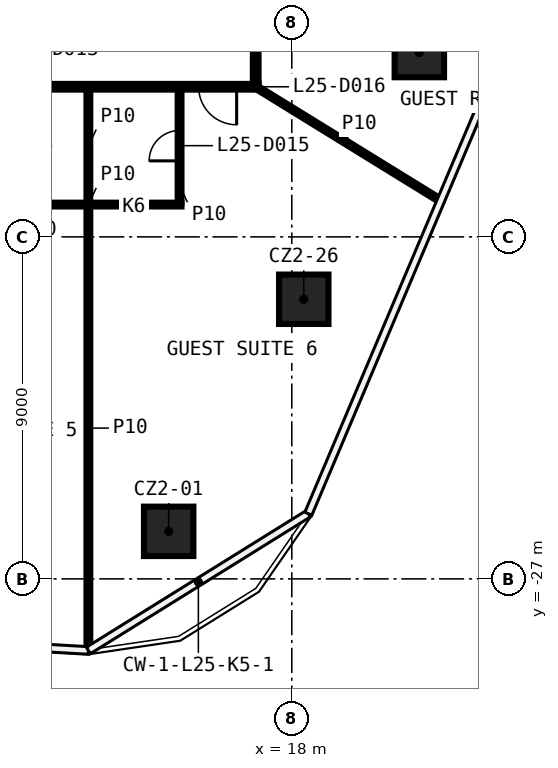
"""IFC4 building model, lengths in metres.
Left out: names, types, materials, properties, quantities, classifications, styles, units other than length and angle.
Written with IfcOpenShell. Run it as: python <this file> out.ifc"""

import sys

from ifc_helpers import new_model, si_unit, direction, frame, frame_2d, origin, origin_2d, place, context, subcontext, project, spatial, rectangle, extrude, element, fill, save


model = new_model("IFC4")
c1 = context("Model", 3, precision=1e-05, world=origin(), true_north=direction((0.0, 1.0)))
c2 = subcontext(c1, "Body", "Model", "MODEL_VIEW")
j1 = project(units=[si_unit("LENGTHUNIT", "METRE"), si_unit("PLANEANGLEUNIT", "RADIAN")], contexts=[c1])
p1 = place(None, origin())
s1 = spatial("IfcSite", under=j1, at=p1, CompositionType="ELEMENT")
p2 = place(p1, origin())
s2 = spatial("IfcBuilding", under=s1, at=p2, CompositionType="ELEMENT")
p3 = place(p2, frame((0.0, 0.0, 117.4)))
s3 = spatial("IfcBuildingStorey", under=s2, at=p3, CompositionType="ELEMENT", Elevation=117.4)
for number, where, z_axis, x_axis in (
    (1, (14.76, -25.749, 0.0), (0.0, 0.0, 1.0), (1.0, 0.0, 0.0)),
    (2, (21.356, -13.15, 0.0), (0.0, 0.0, 1.0), (1.0, 0.0, 0.0)),
    (3, (18.315, -19.642, 0.0), (0.0, 0.0, 1.0), (1.0, 0.0, 0.0)),
):
    element("IfcColumn", number, at=place(p3, frame(where, z_axis=z_axis, x_axis=x_axis)), inside=s3, PredefinedType="COLUMN", context=c2, shape_type="SweptSolid", body=[
        extrude(rectangle(XDim=1.3, YDim=1.3, at=origin_2d()), origin(), (0.0, 0.0, 1.0), 3.3),
    ])
p4 = place(p3, frame((10.197, -17.15, 0.0), z_axis=(0.0, 0.0, 1.0), x_axis=(1.0, 0.0, 0.0)))
e4 = element("IfcWall", 4, at=p4, inside=s3, PredefinedType="PARTITIONING", context=c2, shape_type="SweptSolid", body=[
    extrude(rectangle(XDim=4.9, YDim=0.1, at=frame_2d((2.45, 0.0))), origin(), (0.0, 0.0, 1.0), 3.3),
])
p5 = place(p3, frame((17.125, -14.05, 0.0), z_axis=(0.0, 0.0, 1.0), x_axis=(-1.0, 0.0, 0.0)))
e5 = element("IfcWall", 5, at=p5, inside=s3, PredefinedType="PARTITIONING", context=c2, shape_type="SweptSolid", body=[
    extrude(rectangle(XDim=34.25, YDim=0.15, at=frame_2d((17.125, 0.0))), origin(), (0.0, 0.0, 1.0), 3.3),
])
p6 = place(p5, frame((32.089, 0.0, 0.0)))
e6 = element("IfcOpeningElement", 6, at=p6, cuts=e5, PredefinedType="OPENING", context=c2, shape_type="SweptSolid", body=[
    extrude(rectangle(XDim=0.9, YDim=2.1, at=frame_2d((0.45, 1.05))), frame((0.0, 0.085, 0.0), z_axis=(0.0, -1.0, 0.0), x_axis=(1.0, 0.0, 0.0)), (0.0, 0.0, 1.0), 0.17),
])
p7 = place(p5, frame((25.666, 0.0, 0.0)))
e7 = element("IfcOpeningElement", 7, at=p7, cuts=e5, PredefinedType="OPENING", context=c2, shape_type="SweptSolid", body=[
    extrude(rectangle(XDim=1.0, YDim=2.1, at=frame_2d((0.5, 1.05))), frame((0.0, 0.085, 0.0), z_axis=(0.0, -1.0, 0.0), x_axis=(1.0, 0.0, 0.0)), (0.0, 0.0, 1.0), 0.17),
])
p8 = place(p5, frame((18.714, 0.0, 0.0)))
e8 = element("IfcOpeningElement", 8, at=p8, cuts=e5, PredefinedType="OPENING", context=c2, shape_type="SweptSolid", body=[
    extrude(rectangle(XDim=1.0, YDim=2.1, at=frame_2d((0.5, 1.05))), frame((0.0, 0.085, 0.0), z_axis=(0.0, -1.0, 0.0), x_axis=(1.0, 0.0, 0.0)), (0.0, 0.0, 1.0), 0.17),
])
p9 = place(p5, frame((16.558, 0.0, 0.0)))
e9 = element("IfcOpeningElement", 9, at=p9, cuts=e5, PredefinedType="OPENING", context=c2, shape_type="SweptSolid", body=[
    extrude(rectangle(XDim=1.0, YDim=2.1, at=frame_2d((0.5, 1.05))), frame((0.0, 0.085, 0.0), z_axis=(0.0, -1.0, 0.0), x_axis=(1.0, 0.0, 0.0)), (0.0, 0.0, 1.0), 0.17),
])
p10 = place(p5, frame((9.602, 0.0, 0.0)))
e10 = element("IfcOpeningElement", 10, at=p10, cuts=e5, PredefinedType="OPENING", context=c2, shape_type="SweptSolid", body=[
    extrude(rectangle(XDim=1.0, YDim=2.1, at=frame_2d((0.5, 1.05))), frame((0.0, 0.085, 0.0), z_axis=(0.0, -1.0, 0.0), x_axis=(1.0, 0.0, 0.0)), (0.0, 0.0, 1.0), 0.17),
])
p11 = place(p5, frame((7.451, 0.0, 0.0)))
e11 = element("IfcOpeningElement", 11, at=p11, cuts=e5, PredefinedType="OPENING", context=c2, shape_type="SweptSolid", body=[
    extrude(rectangle(XDim=1.0, YDim=2.1, at=frame_2d((0.5, 1.05))), frame((0.0, 0.085, 0.0), z_axis=(0.0, -1.0, 0.0), x_axis=(1.0, 0.0, 0.0)), (0.0, 0.0, 1.0), 0.17),
])
p12 = place(p5, frame((0.576, 0.0, 0.0)))
e12 = element("IfcOpeningElement", 12, at=p12, cuts=e5, PredefinedType="OPENING", context=c2, shape_type="SweptSolid", body=[
    extrude(rectangle(XDim=1.0, YDim=2.1, at=frame_2d((0.5, 1.05))), frame((0.0, 0.085, 0.0), z_axis=(0.0, -1.0, 0.0), x_axis=(1.0, 0.0, 0.0)), (0.0, 0.0, 1.0), 0.17),
])
p13 = place(p3, frame((17.05, 13.975, 0.0), z_axis=(0.0, 0.0, 1.0), x_axis=(0.0, -1.0, 0.0)))
e13 = element("IfcWall", 13, at=p13, inside=s3, PredefinedType="PARTITIONING", context=c2, shape_type="SweptSolid", body=[
    extrude(rectangle(XDim=27.95, YDim=0.15, at=frame_2d((13.975, 0.0))), origin(), (0.0, 0.0, 1.0), 3.3),
])
p14 = place(p13, frame((25.545, 0.0, 0.0)))
e14 = element("IfcOpeningElement", 14, at=p14, cuts=e13, PredefinedType="OPENING", context=c2, shape_type="SweptSolid", body=[
    extrude(rectangle(XDim=1.0, YDim=2.1, at=frame_2d((0.5, 1.05))), frame((0.0, 0.085, 0.0), z_axis=(0.0, -1.0, 0.0), x_axis=(1.0, 0.0, 0.0)), (0.0, 0.0, 1.0), 0.17),
])
p15 = place(p13, frame((19.024, 0.0, 0.0)))
e15 = element("IfcOpeningElement", 15, at=p15, cuts=e13, PredefinedType="OPENING", context=c2, shape_type="SweptSolid", body=[
    extrude(rectangle(XDim=1.0, YDim=2.1, at=frame_2d((0.5, 1.05))), frame((0.0, 0.085, 0.0), z_axis=(0.0, -1.0, 0.0), x_axis=(1.0, 0.0, 0.0)), (0.0, 0.0, 1.0), 0.17),
])
p16 = place(p13, frame((17.303, 0.0, 0.0)))
e16 = element("IfcOpeningElement", 16, at=p16, cuts=e13, PredefinedType="OPENING", context=c2, shape_type="SweptSolid", body=[
    extrude(rectangle(XDim=1.0, YDim=2.1, at=frame_2d((0.5, 1.05))), frame((0.0, 0.085, 0.0), z_axis=(0.0, -1.0, 0.0), x_axis=(1.0, 0.0, 0.0)), (0.0, 0.0, 1.0), 0.17),
])
p17 = place(p13, frame((11.155, 0.0, 0.0)))
e17 = element("IfcOpeningElement", 17, at=p17, cuts=e13, PredefinedType="OPENING", context=c2, shape_type="SweptSolid", body=[
    extrude(rectangle(XDim=0.9, YDim=2.1, at=frame_2d((0.45, 1.05))), frame((0.0, 0.085, 0.0), z_axis=(0.0, -1.0, 0.0), x_axis=(1.0, 0.0, 0.0)), (0.0, 0.0, 1.0), 0.17),
])
p18 = place(p13, frame((7.145, 0.0, 0.0)))
e18 = element("IfcOpeningElement", 18, at=p18, cuts=e13, PredefinedType="OPENING", context=c2, shape_type="SweptSolid", body=[
    extrude(rectangle(XDim=0.9, YDim=2.1, at=frame_2d((0.45, 1.05))), frame((0.0, 0.085, 0.0), z_axis=(0.0, -1.0, 0.0), x_axis=(1.0, 0.0, 0.0)), (0.0, 0.0, 1.0), 0.17),
])
p19 = place(p13, frame((2.168, 0.0, 0.0)))
e19 = element("IfcOpeningElement", 19, at=p19, cuts=e13, PredefinedType="OPENING", context=c2, shape_type="SweptSolid", body=[
    extrude(rectangle(XDim=0.9, YDim=2.1, at=frame_2d((0.45, 1.05))), frame((0.0, 0.085, 0.0), z_axis=(0.0, -1.0, 0.0), x_axis=(1.0, 0.0, 0.0)), (0.0, 0.0, 1.0), 0.17),
])
p20 = place(p3, frame((15.047, -17.1, 0.0), z_axis=(0.0, 0.0, 1.0), x_axis=(0.0, 1.0, 0.0)))
e20 = element("IfcWall", 20, at=p20, inside=s3, PredefinedType="PARTITIONING", context=c2, shape_type="SweptSolid", body=[
    extrude(rectangle(XDim=2.975, YDim=0.1, at=frame_2d((1.488, 0.0))), origin(), (0.0, 0.0, 1.0), 3.3),
])
p21 = place(p20, frame((1.1, 0.0, 0.0)))
e21 = element("IfcOpeningElement", 21, at=p21, cuts=e20, PredefinedType="OPENING", context=c2, shape_type="SweptSolid", body=[
    extrude(rectangle(XDim=0.8, YDim=2.1, at=frame_2d((0.4, 1.05))), frame((0.0, 0.06, 0.0), z_axis=(0.0, -1.0, 0.0), x_axis=(1.0, 0.0, 0.0)), (0.0, 0.0, 1.0), 0.12),
])
p22 = place(p3, frame((12.647, -28.864, 0.0), z_axis=(0.0, 0.0, 1.0), x_axis=(0.0, 1.0, 0.0)))
e22 = element("IfcWall", 22, at=p22, inside=s3, PredefinedType="PARTITIONING", context=c2, shape_type="SweptSolid", body=[
    extrude(rectangle(XDim=11.664, YDim=0.1, at=frame_2d((5.832, 0.0))), origin(), (0.0, 0.0, 1.0), 3.3),
])
p23 = place(p3, frame((12.647, -17.1, 0.0), z_axis=(0.0, 0.0, 1.0), x_axis=(0.0, 1.0, 0.0)))
e23 = element("IfcWall", 23, at=p23, inside=s3, PredefinedType="PARTITIONING", context=c2, shape_type="SweptSolid", body=[
    extrude(rectangle(XDim=2.975, YDim=0.1, at=frame_2d((1.488, 0.0))), origin(), (0.0, 0.0, 1.0), 3.3),
])
p24 = place(p3, frame((17.05, -14.05, 0.0), z_axis=(0.0, 0.0, 1.0), x_axis=(0.851278656023, -0.524713874221, 0.0)))
e24 = element("IfcWall", 24, at=p24, inside=s3, PredefinedType="PARTITIONING", context=c2, shape_type="SweptSolid", body=[
    extrude(rectangle(XDim=5.7, YDim=0.1, at=frame_2d((2.85, 0.0))), origin(), (0.0, 0.0, 1.0), 3.3),
])
p25 = place(p21, origin())
e25 = element("IfcDoor", 25, at=p25, inside=s3, OperationType="SINGLE_SWING_LEFT", PredefinedType="DOOR", context=c2, shape_type="SweptSolid", body=[
    extrude(rectangle(XDim=0.8, YDim=2.1, at=frame_2d((0.4, 1.05))), frame((0.0, 0.025, 0.0), z_axis=(0.0, -1.0, 0.0), x_axis=(1.0, 0.0, 0.0)), (0.0, 0.0, 1.0), 0.05),
])
fill(e21, e25)
p26 = place(p12, origin())
e26 = element("IfcDoor", 26, at=p26, inside=s3, OperationType="SINGLE_SWING_RIGHT", PredefinedType="DOOR", context=c2, shape_type="SweptSolid", body=[
    extrude(rectangle(XDim=1.0, YDim=2.1, at=frame_2d((0.5, 1.05))), frame((0.0, 0.025, 0.0), z_axis=(0.0, -1.0, 0.0), x_axis=(1.0, 0.0, 0.0)), (0.0, 0.0, 1.0), 0.05),
])
fill(e12, e26)
save(model, sys.argv[1])
